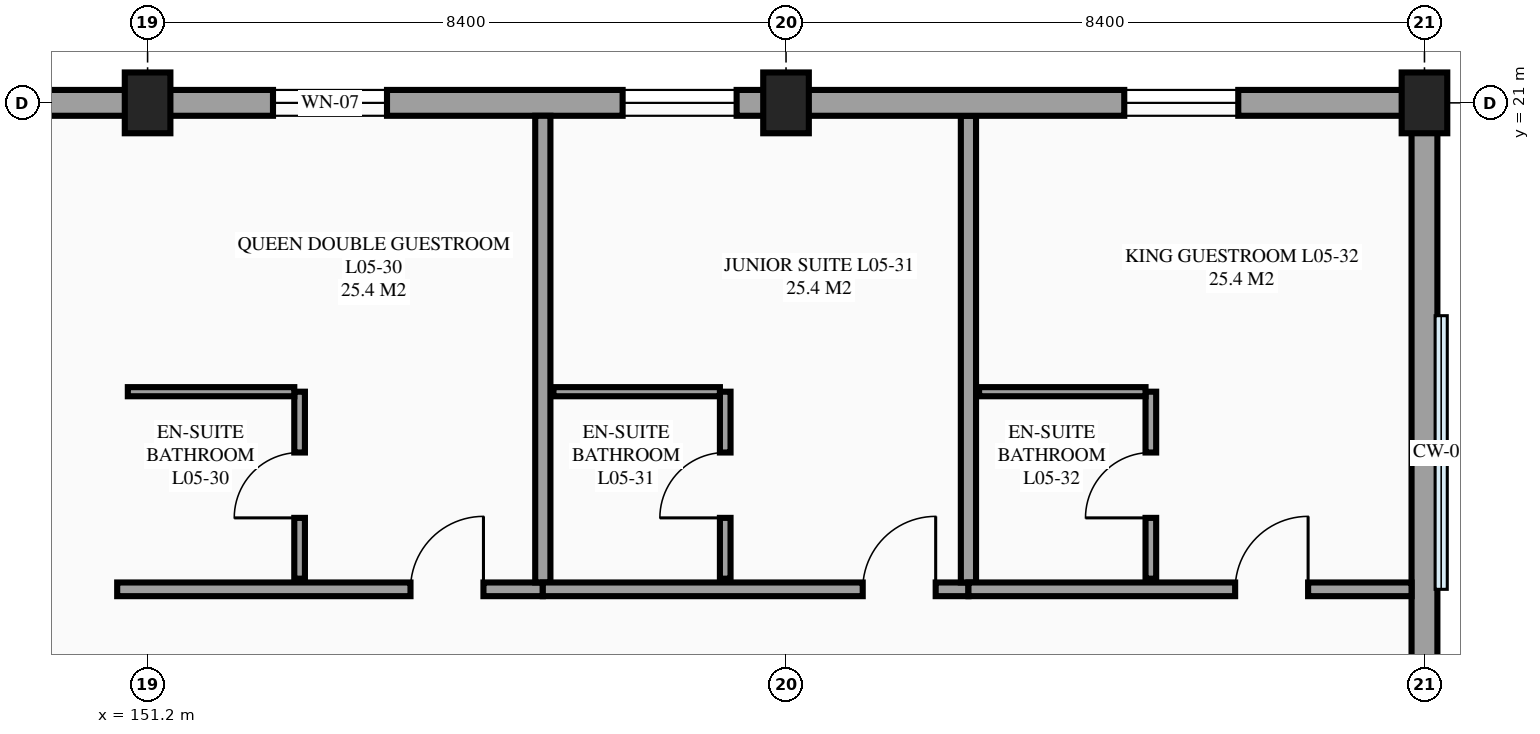
"""IFC4 building model, lengths in metres.
Left out: names, types, materials, properties, quantities, classifications, styles, units other than length and angle.
Written with IfcOpenShell. Run it as: python <this file> out.ifc"""

import sys

from ifc_helpers import new_model, si_unit, direction, frame, frame_2d, origin, origin_2d, place, context, subcontext, project, spatial, rectangle, extrude, element, fill, save


model = new_model("IFC4")
c1 = context("Model", 3, precision=1e-05, world=origin(), true_north=direction((0.0, 1.0)))
c2 = subcontext(c1, "Body", "Model", "MODEL_VIEW")
j1 = project(units=[si_unit("LENGTHUNIT", "METRE"), si_unit("PLANEANGLEUNIT", "RADIAN")], contexts=[c1])
p1 = place(None, origin())
s1 = spatial("IfcSite", under=j1, at=p1, CompositionType="ELEMENT")
p2 = place(p1, origin())
s2 = spatial("IfcBuilding", under=s1, at=p2, CompositionType="ELEMENT")
p3 = place(p2, frame((0.0, 0.0, 21.9)))
s3 = spatial("IfcBuildingStorey", under=s2, at=p3, CompositionType="ELEMENT", Elevation=21.9)
for number, where, z_axis, x_axis in (
    (1, (151.2, 21.0, 0.0), (0.0, 0.0, 1.0), (1.0, 0.0, 0.0)),
    (2, (159.6, 21.0, 0.0), (0.0, 0.0, 1.0), (1.0, 0.0, 0.0)),
    (3, (168.0, 21.0, 0.0), (0.0, 0.0, 1.0), (1.0, 0.0, 0.0)),
):
    element("IfcColumn", number, at=place(p3, frame(where, z_axis=z_axis, x_axis=x_axis)), inside=s3, PredefinedType="COLUMN", context=c2, shape_type="SweptSolid", body=[
        extrude(rectangle(XDim=0.6, YDim=0.8, at=origin_2d()), origin(), (0.0, 0.0, 1.0), 3.6),
    ])
p4 = place(p3, frame((168.0, 4.2, 0.0), z_axis=(0.0, 0.0, 1.0), x_axis=(0.0, 1.0, 0.0)))
e4 = element("IfcWall", 4, at=p4, inside=s3, PredefinedType="STANDARD", context=c2, shape_type="SweptSolid", body=[
    extrude(rectangle(XDim=16.8, YDim=0.34, at=frame_2d((8.4, 0.0))), origin(), (0.0, 0.0, 1.0), 2.48),
])
p5 = place(p3, frame((159.6, 21.0, 0.0), z_axis=(0.0, 0.0, 1.0), x_axis=(-1.0, 0.0, 0.0)))
e5 = element("IfcWall", 5, at=p5, inside=s3, PredefinedType="STANDARD", context=c2, shape_type="SweptSolid", body=[
    extrude(rectangle(XDim=10.4, YDim=0.34, at=frame_2d((5.2, 0.0))), origin(), (0.0, 0.0, 1.0), 2.68),
])
p6 = place(p5, frame((5.25, 0.0, 0.85)))
e6 = element("IfcOpeningElement", 6, at=p6, cuts=e5, PredefinedType="OPENING", context=c2, shape_type="SweptSolid", body=[
    extrude(rectangle(XDim=1.5, YDim=1.5, at=frame_2d((0.75, 0.75))), frame((0.0, 0.18, 0.0), z_axis=(0.0, -1.0, 0.0), x_axis=(1.0, 0.0, 0.0)), (0.0, 0.0, 1.0), 0.36),
])
p7 = place(p5, frame((0.65, 0.0, 0.85)))
e7 = element("IfcOpeningElement", 7, at=p7, cuts=e5, PredefinedType="OPENING", context=c2, shape_type="SweptSolid", body=[
    extrude(rectangle(XDim=1.5, YDim=1.5, at=frame_2d((0.75, 0.75))), frame((0.0, 0.18, 0.0), z_axis=(0.0, -1.0, 0.0), x_axis=(1.0, 0.0, 0.0)), (0.0, 0.0, 1.0), 0.36),
])
p8 = place(p3, frame((150.8, 14.6, 0.0), z_axis=(0.0, 0.0, 1.0), x_axis=(1.0, 0.0, 0.0)))
e8 = element("IfcWall", 8, at=p8, inside=s3, PredefinedType="PARTITIONING", context=c2, shape_type="SweptSolid", body=[
    extrude(rectangle(XDim=5.6, YDim=0.18, at=frame_2d((2.8, 0.0))), origin(), (0.0, 0.0, 1.0), 3.375),
])
p9 = place(p8, frame((3.859, 0.0, 0.0)))
e9 = element("IfcOpeningElement", 9, at=p9, cuts=e8, PredefinedType="OPENING", context=c2, shape_type="SweptSolid", body=[
    extrude(rectangle(XDim=0.96, YDim=2.15, at=frame_2d((0.48, 1.075))), frame((0.0, 0.1, 0.0), z_axis=(0.0, -1.0, 0.0), x_axis=(1.0, 0.0, 0.0)), (0.0, 0.0, 1.0), 0.2),
])
p10 = place(p3, frame((156.4, 14.69, 0.0), z_axis=(0.0, 0.0, 1.0), x_axis=(0.0, 1.0, 0.0)))
e10 = element("IfcWall", 10, at=p10, inside=s3, PredefinedType="PARTITIONING", context=c2, shape_type="SweptSolid", body=[
    extrude(rectangle(XDim=6.14, YDim=0.2, at=frame_2d((3.07, 0.0))), origin(), (0.0, 0.0, 1.0), 3.375),
])
p11 = place(p3, frame((153.2, 14.74, 0.0), z_axis=(0.0, 0.0, 1.0), x_axis=(0.0, 1.0, 0.0)))
e11 = element("IfcWall", 11, at=p11, inside=s3, PredefinedType="PARTITIONING", context=c2, shape_type="SweptSolid", body=[
    extrude(rectangle(XDim=2.46, YDim=0.14, at=frame_2d((1.23, 0.0))), origin(), (0.0, 0.0, 1.0), 3.375),
])
p12 = place(p11, frame((0.8, 0.0, 0.0)))
e12 = element("IfcOpeningElement", 12, at=p12, cuts=e11, PredefinedType="OPENING", context=c2, shape_type="SweptSolid", body=[
    extrude(rectangle(XDim=0.86, YDim=2.1, at=frame_2d((0.43, 1.05))), frame((0.0, 0.08, 0.0), z_axis=(0.0, -1.0, 0.0), x_axis=(1.0, 0.0, 0.0)), (0.0, 0.0, 1.0), 0.16),
])
p13 = place(p3, frame((150.94, 17.2, 0.0), z_axis=(0.0, 0.0, 1.0), x_axis=(1.0, 0.0, 0.0)))
e13 = element("IfcWall", 13, at=p13, inside=s3, PredefinedType="PARTITIONING", context=c2, shape_type="SweptSolid", body=[
    extrude(rectangle(XDim=2.19, YDim=0.12, at=frame_2d((1.095, 0.0))), origin(), (0.0, 0.0, 1.0), 3.375),
])
p14 = place(p3, frame((156.4, 14.6, 0.0), z_axis=(0.0, 0.0, 1.0), x_axis=(1.0, 0.0, 0.0)))
e14 = element("IfcWall", 14, at=p14, inside=s3, PredefinedType="PARTITIONING", context=c2, shape_type="SweptSolid", body=[
    extrude(rectangle(XDim=5.6, YDim=0.18, at=frame_2d((2.8, 0.0))), origin(), (0.0, 0.0, 1.0), 3.375),
])
p15 = place(p14, frame((4.209, 0.0, 0.0)))
e15 = element("IfcOpeningElement", 15, at=p15, cuts=e14, PredefinedType="OPENING", context=c2, shape_type="SweptSolid", body=[
    extrude(rectangle(XDim=0.96, YDim=2.15, at=frame_2d((0.48, 1.075))), frame((0.0, 0.1, 0.0), z_axis=(0.0, -1.0, 0.0), x_axis=(1.0, 0.0, 0.0)), (0.0, 0.0, 1.0), 0.2),
])
p16 = place(p3, frame((162.0, 14.69, 0.0), z_axis=(0.0, 0.0, 1.0), x_axis=(0.0, 1.0, 0.0)))
e16 = element("IfcWall", 16, at=p16, inside=s3, PredefinedType="PARTITIONING", context=c2, shape_type="SweptSolid", body=[
    extrude(rectangle(XDim=6.14, YDim=0.2, at=frame_2d((3.07, 0.0))), origin(), (0.0, 0.0, 1.0), 3.375),
])
p17 = place(p3, frame((158.8, 14.74, 0.0), z_axis=(0.0, 0.0, 1.0), x_axis=(0.0, 1.0, 0.0)))
e17 = element("IfcWall", 17, at=p17, inside=s3, PredefinedType="PARTITIONING", context=c2, shape_type="SweptSolid", body=[
    extrude(rectangle(XDim=2.46, YDim=0.14, at=frame_2d((1.23, 0.0))), origin(), (0.0, 0.0, 1.0), 3.375),
])
p18 = place(p17, frame((0.8, 0.0, 0.0)))
e18 = element("IfcOpeningElement", 18, at=p18, cuts=e17, PredefinedType="OPENING", context=c2, shape_type="SweptSolid", body=[
    extrude(rectangle(XDim=0.86, YDim=2.1, at=frame_2d((0.43, 1.05))), frame((0.0, 0.08, 0.0), z_axis=(0.0, -1.0, 0.0), x_axis=(1.0, 0.0, 0.0)), (0.0, 0.0, 1.0), 0.16),
])
p19 = place(p3, frame((156.54, 17.2, 0.0), z_axis=(0.0, 0.0, 1.0), x_axis=(1.0, 0.0, 0.0)))
e19 = element("IfcWall", 19, at=p19, inside=s3, PredefinedType="PARTITIONING", context=c2, shape_type="SweptSolid", body=[
    extrude(rectangle(XDim=2.19, YDim=0.12, at=frame_2d((1.095, 0.0))), origin(), (0.0, 0.0, 1.0), 3.375),
])
p20 = place(p3, frame((162.0, 14.6, 0.0), z_axis=(0.0, 0.0, 1.0), x_axis=(1.0, 0.0, 0.0)))
e20 = element("IfcWall", 20, at=p20, inside=s3, PredefinedType="PARTITIONING", context=c2, shape_type="SweptSolid", body=[
    extrude(rectangle(XDim=5.83, YDim=0.18, at=frame_2d((2.915, 0.0))), origin(), (0.0, 0.0, 1.0), 3.375),
])
p21 = place(p20, frame((3.509, 0.0, 0.0)))
e21 = element("IfcOpeningElement", 21, at=p21, cuts=e20, PredefinedType="OPENING", context=c2, shape_type="SweptSolid", body=[
    extrude(rectangle(XDim=0.96, YDim=2.15, at=frame_2d((0.48, 1.075))), frame((0.0, 0.1, 0.0), z_axis=(0.0, -1.0, 0.0), x_axis=(1.0, 0.0, 0.0)), (0.0, 0.0, 1.0), 0.2),
])
p22 = place(p3, frame((164.4, 14.74, 0.0), z_axis=(0.0, 0.0, 1.0), x_axis=(0.0, 1.0, 0.0)))
e22 = element("IfcWall", 22, at=p22, inside=s3, PredefinedType="PARTITIONING", context=c2, shape_type="SweptSolid", body=[
    extrude(rectangle(XDim=2.46, YDim=0.14, at=frame_2d((1.23, 0.0))), origin(), (0.0, 0.0, 1.0), 3.375),
])
p23 = place(p22, frame((0.8, 0.0, 0.0)))
e23 = element("IfcOpeningElement", 23, at=p23, cuts=e22, PredefinedType="OPENING", context=c2, shape_type="SweptSolid", body=[
    extrude(rectangle(XDim=0.86, YDim=2.1, at=frame_2d((0.43, 1.05))), frame((0.0, 0.08, 0.0), z_axis=(0.0, -1.0, 0.0), x_axis=(1.0, 0.0, 0.0)), (0.0, 0.0, 1.0), 0.16),
])
p24 = place(p3, frame((162.14, 17.2, 0.0), z_axis=(0.0, 0.0, 1.0), x_axis=(1.0, 0.0, 0.0)))
e24 = element("IfcWall", 24, at=p24, inside=s3, PredefinedType="PARTITIONING", context=c2, shape_type="SweptSolid", body=[
    extrude(rectangle(XDim=2.19, YDim=0.12, at=frame_2d((1.095, 0.0))), origin(), (0.0, 0.0, 1.0), 3.375),
])
p25 = place(p3, frame((168.0, 21.0, 0.0), z_axis=(0.0, 0.0, 1.0), x_axis=(-1.0, 0.0, 0.0)))
e25 = element("IfcWall", 25, at=p25, inside=s3, PredefinedType="STANDARD", context=c2, shape_type="SweptSolid", body=[
    extrude(rectangle(XDim=8.4, YDim=0.34, at=frame_2d((4.2, 0.0))), origin(), (0.0, 0.0, 1.0), 3.126),
])
p26 = place(p25, frame((2.45, 0.0, 0.85)))
e26 = element("IfcOpeningElement", 26, at=p26, cuts=e25, PredefinedType="OPENING", context=c2, shape_type="SweptSolid", body=[
    extrude(rectangle(XDim=1.5, YDim=1.5, at=frame_2d((0.75, 0.75))), frame((0.0, 0.18, 0.0), z_axis=(0.0, -1.0, 0.0), x_axis=(1.0, 0.0, 0.0)), (0.0, 0.0, 1.0), 0.36),
])
p27 = place(p6, origin())
e27 = element("IfcWindow", 27, at=p27, inside=s3, PartitioningType="SINGLE_PANEL", PredefinedType="WINDOW", context=c2, shape_type="SweptSolid", body=[
    extrude(rectangle(XDim=1.5, YDim=1.5, at=frame_2d((0.75, 0.75))), frame((0.0, 0.03, 0.0), z_axis=(0.0, -1.0, 0.0), x_axis=(1.0, 0.0, 0.0)), (0.0, 0.0, 1.0), 0.06),
])
fill(e6, e27)
p28 = place(p7, origin())
e28 = element("IfcWindow", 28, at=p28, inside=s3, PartitioningType="SINGLE_PANEL", PredefinedType="WINDOW", context=c2, shape_type="SweptSolid", body=[
    extrude(rectangle(XDim=1.5, YDim=1.5, at=frame_2d((0.75, 0.75))), frame((0.0, 0.03, 0.0), z_axis=(0.0, -1.0, 0.0), x_axis=(1.0, 0.0, 0.0)), (0.0, 0.0, 1.0), 0.06),
])
fill(e7, e28)
p29 = place(p26, origin())
e29 = element("IfcWindow", 29, at=p29, inside=s3, PartitioningType="SINGLE_PANEL", PredefinedType="WINDOW", context=c2, shape_type="SweptSolid", body=[
    extrude(rectangle(XDim=1.5, YDim=1.5, at=frame_2d((0.75, 0.75))), frame((0.0, 0.03, 0.0), z_axis=(0.0, -1.0, 0.0), x_axis=(1.0, 0.0, 0.0)), (0.0, 0.0, 1.0), 0.06),
])
fill(e26, e29)
p30 = place(p9, origin())
e30 = element("IfcDoor", 30, at=p30, inside=s3, OperationType="SINGLE_SWING_RIGHT", PredefinedType="DOOR", context=c2, shape_type="SweptSolid", body=[
    extrude(rectangle(XDim=0.96, YDim=2.15, at=frame_2d((0.48, 1.075))), frame((0.0, 0.025, 0.0), z_axis=(0.0, -1.0, 0.0), x_axis=(1.0, 0.0, 0.0)), (0.0, 0.0, 1.0), 0.05),
])
fill(e9, e30)
p31 = place(p12, origin())
e31 = element("IfcDoor", 31, at=p31, inside=s3, OperationType="SINGLE_SWING_LEFT", PredefinedType="DOOR", context=c2, shape_type="SweptSolid", body=[
    extrude(rectangle(XDim=0.86, YDim=2.1, at=frame_2d((0.43, 1.05))), frame((0.0, 0.025, 0.0), z_axis=(0.0, -1.0, 0.0), x_axis=(1.0, 0.0, 0.0)), (0.0, 0.0, 1.0), 0.05),
])
fill(e12, e31)
p32 = place(p15, origin())
e32 = element("IfcDoor", 32, at=p32, inside=s3, OperationType="SINGLE_SWING_RIGHT", PredefinedType="DOOR", context=c2, shape_type="SweptSolid", body=[
    extrude(rectangle(XDim=0.96, YDim=2.15, at=frame_2d((0.48, 1.075))), frame((0.0, 0.025, 0.0), z_axis=(0.0, -1.0, 0.0), x_axis=(1.0, 0.0, 0.0)), (0.0, 0.0, 1.0), 0.05),
])
fill(e15, e32)
p33 = place(p18, origin())
e33 = element("IfcDoor", 33, at=p33, inside=s3, OperationType="SINGLE_SWING_LEFT", PredefinedType="DOOR", context=c2, shape_type="SweptSolid", body=[
    extrude(rectangle(XDim=0.86, YDim=2.1, at=frame_2d((0.43, 1.05))), frame((0.0, 0.025, 0.0), z_axis=(0.0, -1.0, 0.0), x_axis=(1.0, 0.0, 0.0)), (0.0, 0.0, 1.0), 0.05),
])
fill(e18, e33)
p34 = place(p21, origin())
e34 = element("IfcDoor", 34, at=p34, inside=s3, OperationType="SINGLE_SWING_RIGHT", PredefinedType="DOOR", context=c2, shape_type="SweptSolid", body=[
    extrude(rectangle(XDim=0.96, YDim=2.15, at=frame_2d((0.48, 1.075))), frame((0.0, 0.025, 0.0), z_axis=(0.0, -1.0, 0.0), x_axis=(1.0, 0.0, 0.0)), (0.0, 0.0, 1.0), 0.05),
])
fill(e21, e34)
p35 = place(p23, origin())
e35 = element("IfcDoor", 35, at=p35, inside=s3, OperationType="SINGLE_SWING_LEFT", PredefinedType="DOOR", context=c2, shape_type="SweptSolid", body=[
    extrude(rectangle(XDim=0.86, YDim=2.1, at=frame_2d((0.43, 1.05))), frame((0.0, 0.025, 0.0), z_axis=(0.0, -1.0, 0.0), x_axis=(1.0, 0.0, 0.0)), (0.0, 0.0, 1.0), 0.05),
])
fill(e23, e35)
save(model, sys.argv[1])
